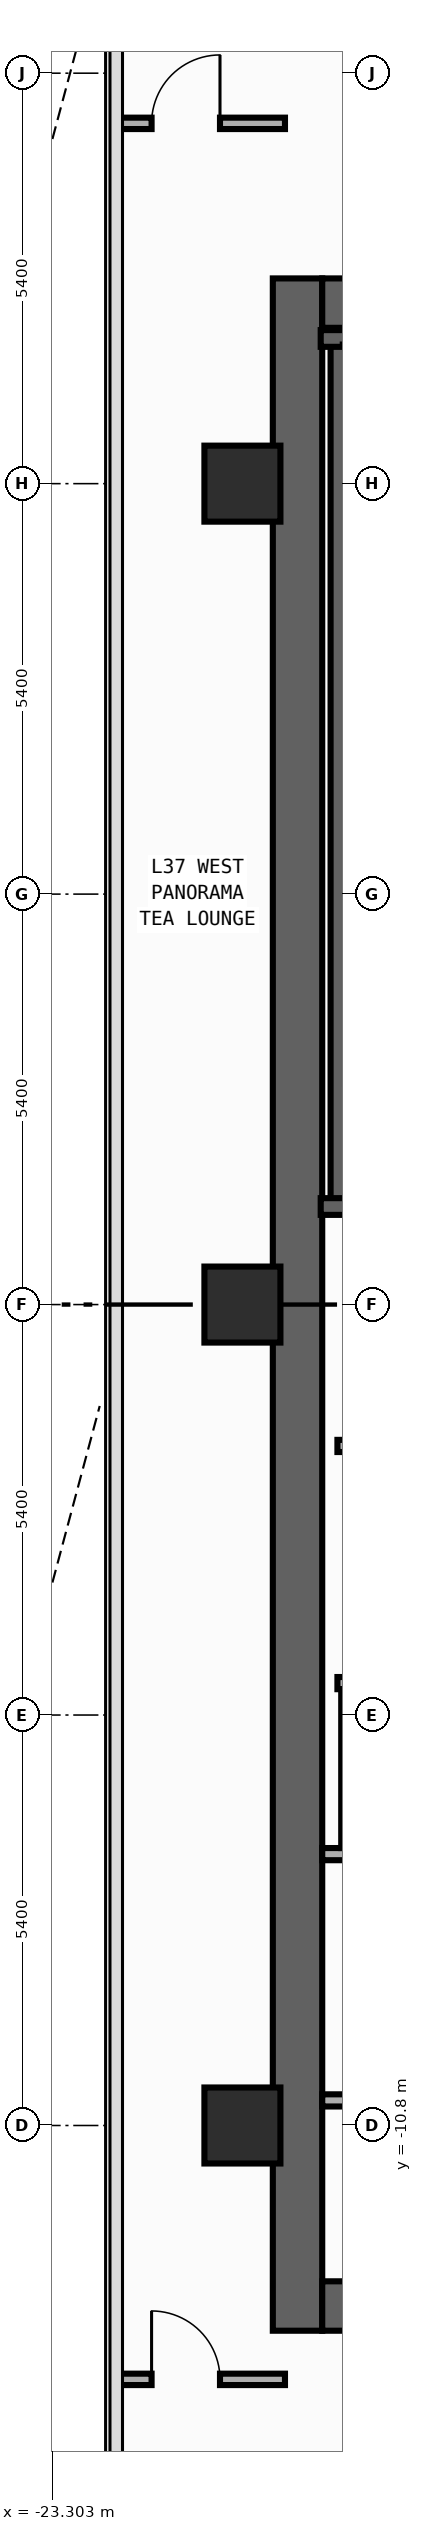
"""IFC4 building model, lengths in metres.
Left out: names, types, materials, properties, quantities, classifications, styles, units other than length and angle.
Written with IfcOpenShell. Run it as: python <this file> out.ifc"""

import sys

from ifc_helpers import new_model, si_unit, direction, frame, frame_2d, origin, origin_2d, place, context, subcontext, project, spatial, rectangle, extrude, element, fill, save


model = new_model("IFC4")
c1 = context("Model", 3, precision=1e-05, world=origin(), true_north=direction((0.0, 1.0)))
c2 = subcontext(c1, "Body", "Model", "MODEL_VIEW")
j1 = project(units=[si_unit("LENGTHUNIT", "METRE"), si_unit("PLANEANGLEUNIT", "RADIAN")], contexts=[c1])
p1 = place(None, origin())
s1 = spatial("IfcSite", under=j1, at=p1, CompositionType="ELEMENT")
p2 = place(p1, origin())
s2 = spatial("IfcBuilding", under=s1, at=p2, CompositionType="ELEMENT")
p3 = place(p2, frame((0.0, 0.0, 165.0)))
s3 = spatial("IfcBuildingStorey", under=s2, at=p3, CompositionType="ELEMENT", Elevation=165.0)
p4 = place(p3, frame((-20.075, -13.5, 0.0), z_axis=(0.0, 0.0, 1.0), x_axis=(0.0, 1.0, 0.0)))
e1 = element("IfcWall", 1, at=p4, inside=s3, PredefinedType="SHEAR", context=c2, shape_type="SweptSolid", body=[
    extrude(rectangle(XDim=27.0, YDim=0.65, at=frame_2d((13.5, 0.0))), origin(), (0.0, 0.0, 1.0), 3.54),
])
for number, where, z_axis, x_axis in (
    (2, (-19.75, -13.175, 0.0), (0.0, 0.0, 1.0), (1.0, 0.0, 0.0)),
    (3, (-19.75, 13.175, 0.0), (0.0, 0.0, 1.0), (1.0, 0.0, 0.0)),
):
    element("IfcWall", number, at=place(p3, frame(where, z_axis=z_axis, x_axis=x_axis)), inside=s3, PredefinedType="SHEAR", context=c2, shape_type="SweptSolid", body=[
        extrude(rectangle(XDim=7.1, YDim=0.65, at=frame_2d((3.55, 0.0))), origin(), (0.0, 0.0, 1.0), 3.54),
    ])
p5 = place(p3, frame((-19.53, 1.29, 0.0), z_axis=(0.0, 0.0, 1.0), x_axis=(0.0, 1.0, 0.0)))
e4 = element("IfcWall", 4, at=p5, inside=s3, PredefinedType="SHEAR", context=c2, shape_type="SweptSolid", body=[
    extrude(rectangle(XDim=11.42, YDim=0.22, at=frame_2d((5.71, 0.0))), origin(), (0.0, 0.0, 1.0), 3.54),
])
p6 = place(p3, frame((-19.77, 12.71, 0.0), z_axis=(0.0, 0.0, 1.0), x_axis=(1.0, 0.0, 0.0)))
e5 = element("IfcWall", 5, at=p6, inside=s3, PredefinedType="SHEAR", context=c2, shape_type="SweptSolid", body=[
    extrude(rectangle(XDim=4.065, YDim=0.22, at=frame_2d((2.032, 0.0))), origin(), (0.0, 0.0, 1.0), 3.54),
])
p7 = place(p3, frame((-19.77, 1.29, 0.0), z_axis=(0.0, 0.0, 1.0), x_axis=(1.0, 0.0, 0.0)))
e6 = element("IfcWall", 6, at=p7, inside=s3, PredefinedType="SHEAR", context=c2, shape_type="SweptSolid", body=[
    extrude(rectangle(XDim=4.065, YDim=0.22, at=frame_2d((2.032, 0.0))), origin(), (0.0, 0.0, 1.0), 3.54),
])
p8 = place(p7, frame((1.08, 0.0, 0.0)))
e7 = element("IfcOpeningElement", 7, at=p8, cuts=e6, PredefinedType="OPENING", context=c2, shape_type="SweptSolid", body=[
    extrude(rectangle(XDim=1.1, YDim=2.2, at=frame_2d((0.55, 1.1))), frame((0.0, 0.12, 0.0), z_axis=(0.0, -1.0, 0.0), x_axis=(1.0, 0.0, 0.0)), (0.0, 0.0, 1.0), 0.24),
])
for number, where, z_axis, x_axis in (
    (8, (-20.8, -10.8, 0.0), (0.0, 0.0, 1.0), (1.0, 0.0, 0.0)),
    (9, (-20.8, 0.0, 0.0), (0.0, 0.0, 1.0), (1.0, 0.0, 0.0)),
    (10, (-20.8, 10.8, 0.0), (0.0, 0.0, 1.0), (1.0, 0.0, 0.0)),
):
    element("IfcColumn", number, at=place(p3, frame(where, z_axis=z_axis, x_axis=x_axis)), inside=s3, PredefinedType="COLUMN", context=c2, shape_type="SweptSolid", body=[
        extrude(rectangle(XDim=1.0, YDim=1.0, at=origin_2d()), origin(), (0.0, 0.0, 1.0), 3.8),
    ])
p9 = place(p3, frame((-19.55, -1.86, 0.0), z_axis=(0.0, 0.0, 1.0), x_axis=(1.0, 0.0, 0.0)))
e11 = element("IfcWall", 11, at=p9, inside=s3, PredefinedType="STANDARD", context=c2, shape_type="SweptSolid", body=[
    extrude(rectangle(XDim=3.8, YDim=0.16, at=frame_2d((1.9, 0.0))), origin(), (0.0, 0.0, 1.0), 3.54),
])
p10 = place(p9, frame((1.18, 0.0, 0.0)))
e12 = element("IfcOpeningElement", 12, at=p10, cuts=e11, PredefinedType="OPENING", context=c2, shape_type="SweptSolid", body=[
    extrude(rectangle(XDim=1.15, YDim=2.2, at=frame_2d((0.575, 1.1))), frame((0.0, 0.09, 0.0), z_axis=(0.0, -1.0, 0.0), x_axis=(1.0, 0.0, 0.0)), (0.0, 0.0, 1.0), 0.18),
])
p11 = place(p3, frame((-19.55, -4.98, 0.0), z_axis=(0.0, 0.0, 1.0), x_axis=(1.0, 0.0, 0.0)))
e13 = element("IfcWall", 13, at=p11, inside=s3, PredefinedType="STANDARD", context=c2, shape_type="SweptSolid", body=[
    extrude(rectangle(XDim=3.8, YDim=0.16, at=frame_2d((1.9, 0.0))), origin(), (0.0, 0.0, 1.0), 3.54),
])
for number, where, z_axis, x_axis in (
    (14, (-19.75, -10.47, 0.0), (0.0, 0.0, 1.0), (1.0, 0.0, 0.0)),
    (15, (-19.75, -7.23, 0.0), (0.0, 0.0, 1.0), (1.0, 0.0, 0.0)),
):
    element("IfcWall", number, at=place(p3, frame(where, z_axis=z_axis, x_axis=x_axis)), inside=s3, PredefinedType="PARTITIONING", context=c2, shape_type="SweptSolid", body=[
        extrude(rectangle(XDim=2.44, YDim=0.16, at=frame_2d((1.22, 0.0))), origin(), (0.0, 0.0, 1.0), 3.54),
    ])
p12 = place(p3, frame((-22.455, 15.54, 0.0), z_axis=(0.0, 0.0, 1.0), x_axis=(1.0, 0.0, 0.0)))
e16 = element("IfcWall", 16, at=p12, inside=s3, PredefinedType="PARTITIONING", context=c2, shape_type="SweptSolid", body=[
    extrude(rectangle(XDim=2.215, YDim=0.15, at=frame_2d((1.107, 0.0))), origin(), (0.0, 0.0, 1.0), 3.54),
])
p13 = place(p12, frame((0.46, 0.0, 0.0)))
e17 = element("IfcOpeningElement", 17, at=p13, cuts=e16, PredefinedType="OPENING", context=c2, shape_type="SweptSolid", body=[
    extrude(rectangle(XDim=0.9, YDim=2.15, at=frame_2d((0.45, 1.075))), frame((0.0, 0.085, 0.0), z_axis=(0.0, -1.0, 0.0), x_axis=(1.0, 0.0, 0.0)), (0.0, 0.0, 1.0), 0.17),
])
p14 = place(p3, frame((-22.455, -14.14, 0.0), z_axis=(0.0, 0.0, 1.0), x_axis=(1.0, 0.0, 0.0)))
e18 = element("IfcWall", 18, at=p14, inside=s3, PredefinedType="PARTITIONING", context=c2, shape_type="SweptSolid", body=[
    extrude(rectangle(XDim=2.215, YDim=0.15, at=frame_2d((1.107, 0.0))), origin(), (0.0, 0.0, 1.0), 3.54),
])
p15 = place(p14, frame((0.46, 0.0, 0.0)))
e19 = element("IfcOpeningElement", 19, at=p15, cuts=e18, PredefinedType="OPENING", context=c2, shape_type="SweptSolid", body=[
    extrude(rectangle(XDim=0.9, YDim=2.15, at=frame_2d((0.45, 1.075))), frame((0.0, 0.085, 0.0), z_axis=(0.0, -1.0, 0.0), x_axis=(1.0, 0.0, 0.0)), (0.0, 0.0, 1.0), 0.17),
])
p16 = place(p3, frame((-19.45, -7.15, 0.0), z_axis=(0.0, 0.0, 1.0), x_axis=(0.0, 1.0, 0.0)))
e20 = element("IfcWall", 20, at=p16, inside=s3, PredefinedType="PARTITIONING", context=c2, shape_type="SweptSolid", body=[
    extrude(rectangle(XDim=2.09, YDim=0.1, at=frame_2d((1.045, 0.0))), origin(), (0.0, 0.0, 1.0), 3.54),
])
p17 = place(p13, origin())
e21 = element("IfcDoor", 21, at=p17, inside=s3, OperationType="SINGLE_SWING_RIGHT", PredefinedType="DOOR", context=c2, shape_type="SweptSolid", body=[
    extrude(rectangle(XDim=0.9, YDim=2.15, at=frame_2d((0.45, 1.075))), frame((0.0, 0.025, 0.0), z_axis=(0.0, -1.0, 0.0), x_axis=(1.0, 0.0, 0.0)), (0.0, 0.0, 1.0), 0.05),
])
fill(e17, e21)
p18 = place(p15, origin())
e22 = element("IfcDoor", 22, at=p18, inside=s3, OperationType="SINGLE_SWING_LEFT", PredefinedType="DOOR", context=c2, shape_type="SweptSolid", body=[
    extrude(rectangle(XDim=0.9, YDim=2.15, at=frame_2d((0.45, 1.075))), frame((0.0, 0.025, 0.0), z_axis=(0.0, -1.0, 0.0), x_axis=(1.0, 0.0, 0.0)), (0.0, 0.0, 1.0), 0.05),
])
fill(e19, e22)
save(model, sys.argv[1])
